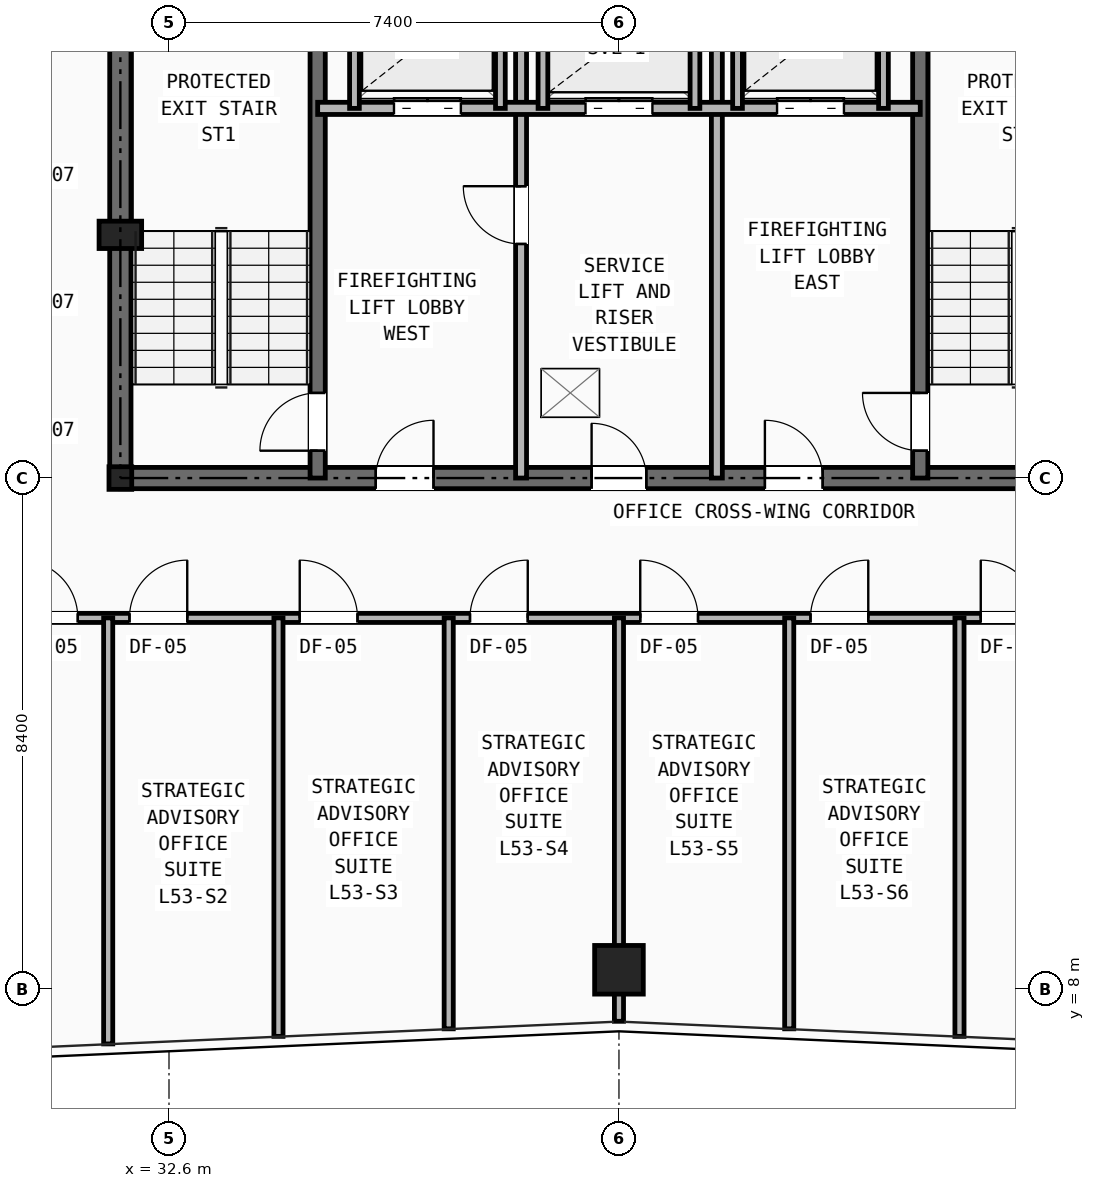
"""IFC4 building model, lengths in metres.
Left out: names, types, materials, properties, quantities, classifications, styles, units other than length and angle.
Written with IfcOpenShell. Run it as: python <this file> out.ifc"""

import sys

from ifc_helpers import new_model, si_unit, direction, frame, frame_2d, origin, origin_2d, place, context, subcontext, project, spatial, rectangle, hollow_rectangle, i_section, extrude, element, fill, save


model = new_model("IFC4")
c1 = context("Model", 3, precision=1e-05, world=origin(), true_north=direction((0.0, 1.0)))
c2 = subcontext(c1, "Body", "Model", "MODEL_VIEW")
j1 = project(units=[si_unit("LENGTHUNIT", "METRE"), si_unit("PLANEANGLEUNIT", "RADIAN")], contexts=[c1])
p1 = place(None, origin())
s1 = spatial("IfcSite", under=j1, at=p1, CompositionType="ELEMENT")
p2 = place(p1, origin())
s2 = spatial("IfcBuilding", under=s1, at=p2, CompositionType="ELEMENT")
p3 = place(p2, frame((0.0, 0.0, 186.15)))
s3 = spatial("IfcBuildingStorey", under=s2, at=p3, CompositionType="ELEMENT", Elevation=186.15)
p4 = place(p3, frame((31.8, 16.4, 0.0), z_axis=(0.0, 0.0, 1.0), x_axis=(1.0, 0.0, 0.0)))
e1 = element("IfcColumn", 1, at=p4, inside=s3, PredefinedType="COLUMN", context=c2, shape_type="SweptSolid", body=[
    extrude(i_section(OverallWidth=0.374, OverallDepth=0.372, WebThickness=0.016, FlangeThickness=0.026, at=origin_2d()), origin(), (0.0, 0.0, 1.0), 3.45),
])
p5 = place(p3, frame((31.8, 20.4, 0.0), z_axis=(0.0, 0.0, 1.0), x_axis=(1.0, 0.0, 0.0)))
e2 = element("IfcColumn", 2, at=p5, inside=s3, PredefinedType="PILASTER", context=c2, shape_type="SweptSolid", body=[
    extrude(rectangle(XDim=0.7, YDim=0.45, at=origin_2d()), origin(), (0.0, 0.0, 1.0), 3.45),
])
p6 = place(p3, frame((40.0, 8.312, 0.0), z_axis=(0.0, 0.0, 1.0), x_axis=(1.0, 0.0, 0.0)))
e3 = element("IfcColumn", 3, at=p6, inside=s3, PredefinedType="COLUMN", context=c2, shape_type="SweptSolid", body=[
    extrude(hollow_rectangle(XDim=0.8, YDim=0.8, WallThickness=0.055, at=origin_2d()), origin(), (0.0, 0.0, 1.0), 3.45),
])
p7 = place(p3, frame((31.8, 16.4, 0.0), z_axis=(0.0, 0.0, 1.0), x_axis=(1.0, 0.0, 0.0)))
e4 = element("IfcWall", 4, at=p7, inside=s3, PredefinedType="SHEAR", context=c2, shape_type="SweptSolid", body=[
    extrude(rectangle(XDim=16.4, YDim=0.35, at=frame_2d((8.2, 0.0))), origin(), (0.0, 0.0, 1.0), 3.21),
])
p8 = place(p7, frame((7.75, 0.0, 0.0)))
e5 = element("IfcOpeningElement", 5, at=p8, cuts=e4, PredefinedType="OPENING", context=c2, shape_type="SweptSolid", body=[
    extrude(rectangle(XDim=0.9, YDim=2.1, at=frame_2d((0.45, 1.05))), frame((0.0, 0.185, 0.0), z_axis=(0.0, -1.0, 0.0), x_axis=(1.0, 0.0, 0.0)), (0.0, 0.0, 1.0), 0.37),
])
p9 = place(p7, frame((4.2, 0.0, 0.0)))
e6 = element("IfcOpeningElement", 6, at=p9, cuts=e4, PredefinedType="OPENING", context=c2, shape_type="SweptSolid", body=[
    extrude(rectangle(XDim=0.95, YDim=2.1, at=frame_2d((0.475, 1.05))), frame((0.0, 0.185, 0.0), z_axis=(0.0, -1.0, 0.0), x_axis=(1.0, 0.0, 0.0)), (0.0, 0.0, 1.0), 0.37),
])
p10 = place(p7, frame((10.6, 0.0, 0.0)))
e7 = element("IfcOpeningElement", 7, at=p10, cuts=e4, PredefinedType="OPENING", context=c2, shape_type="SweptSolid", body=[
    extrude(rectangle(XDim=0.95, YDim=2.1, at=frame_2d((0.475, 1.05))), frame((0.0, 0.185, 0.0), z_axis=(0.0, -1.0, 0.0), x_axis=(1.0, 0.0, 0.0)), (0.0, 0.0, 1.0), 0.37),
])
p11 = place(p3, frame((31.8, 16.4, 0.0), z_axis=(0.0, 0.0, 1.0), x_axis=(0.0, 1.0, 0.0)))
e8 = element("IfcWall", 8, at=p11, inside=s3, PredefinedType="SHEAR", context=c2, shape_type="SweptSolid", body=[
    extrude(rectangle(XDim=14.8, YDim=0.35, at=frame_2d((7.4, 0.0))), origin(), (0.0, 0.0, 1.0), 3.21),
])
p12 = place(p11, frame((11.0, 0.0, 0.0)))
e9 = element("IfcOpeningElement", 9, at=p12, cuts=e8, PredefinedType="OPENING", context=c2, shape_type="SweptSolid", body=[
    extrude(rectangle(XDim=1.1, YDim=2.15, at=frame_2d((0.55, 1.075))), frame((0.0, 0.185, 0.0), z_axis=(0.0, -1.0, 0.0), x_axis=(1.0, 0.0, 0.0)), (0.0, 0.0, 1.0), 0.37),
])
p13 = place(p3, frame((35.045, 16.4, 0.0), z_axis=(0.0, 0.0, 1.0), x_axis=(0.0, 1.0, 0.0)))
e10 = element("IfcWall", 10, at=p13, inside=s3, PredefinedType="SHEAR", context=c2, shape_type="SweptSolid", body=[
    extrude(rectangle(XDim=8.4, YDim=0.25, at=frame_2d((4.2, 0.0))), origin(), (0.0, 0.0, 1.0), 3.21),
])
p14 = place(p13, frame((0.45, 0.0, 0.0)))
e11 = element("IfcOpeningElement", 11, at=p14, cuts=e10, PredefinedType="OPENING", context=c2, shape_type="SweptSolid", body=[
    extrude(rectangle(XDim=0.95, YDim=2.1, at=frame_2d((0.475, 1.05))), frame((0.0, 0.135, 0.0), z_axis=(0.0, -1.0, 0.0), x_axis=(1.0, 0.0, 0.0)), (0.0, 0.0, 1.0), 0.27),
])
p15 = place(p3, frame((44.955, 16.4, 0.0), z_axis=(0.0, 0.0, 1.0), x_axis=(0.0, 1.0, 0.0)))
e12 = element("IfcWall", 12, at=p15, inside=s3, PredefinedType="SHEAR", context=c2, shape_type="SweptSolid", body=[
    extrude(rectangle(XDim=8.4, YDim=0.25, at=frame_2d((4.2, 0.0))), origin(), (0.0, 0.0, 1.0), 3.21),
])
p16 = place(p15, frame((0.45, 0.0, 0.0)))
e13 = element("IfcOpeningElement", 13, at=p16, cuts=e12, PredefinedType="OPENING", context=c2, shape_type="SweptSolid", body=[
    extrude(rectangle(XDim=0.95, YDim=2.1, at=frame_2d((0.475, 1.05))), frame((0.0, 0.135, 0.0), z_axis=(0.0, -1.0, 0.0), x_axis=(1.0, 0.0, 0.0)), (0.0, 0.0, 1.0), 0.27),
])
p17 = place(p3, frame((38.39, 16.4, 0.0), z_axis=(0.0, 0.0, 1.0), x_axis=(0.0, 1.0, 0.0)))
e14 = element("IfcWall", 14, at=p17, inside=s3, PredefinedType="PARTITIONING", context=c2, shape_type="SweptSolid", body=[
    extrude(rectangle(XDim=8.4, YDim=0.18, at=frame_2d((4.2, 0.0))), origin(), (0.0, 0.0, 1.0), 2.665),
])
p18 = place(p17, frame((3.85, 0.0, 0.0)))
e15 = element("IfcOpeningElement", 15, at=p18, cuts=e14, PredefinedType="OPENING", context=c2, shape_type="SweptSolid", body=[
    extrude(rectangle(XDim=0.95, YDim=2.1, at=frame_2d((0.475, 1.05))), frame((0.0, 0.1, 0.0), z_axis=(0.0, -1.0, 0.0), x_axis=(1.0, 0.0, 0.0)), (0.0, 0.0, 1.0), 0.2),
])
p19 = place(p3, frame((41.61, 16.4, 0.0), z_axis=(0.0, 0.0, 1.0), x_axis=(0.0, 1.0, 0.0)))
e16 = element("IfcWall", 16, at=p19, inside=s3, PredefinedType="PARTITIONING", context=c2, shape_type="SweptSolid", body=[
    extrude(rectangle(XDim=8.4, YDim=0.18, at=frame_2d((4.2, 0.0))), origin(), (0.0, 0.0, 1.0), 2.665),
])
p20 = place(p3, frame((35.045, 22.48, 0.0), z_axis=(0.0, 0.0, 1.0), x_axis=(1.0, 0.0, 0.0)))
e17 = element("IfcWall", 17, at=p20, inside=s3, PredefinedType="SOLIDWALL", context=c2, shape_type="SweptSolid", body=[
    extrude(rectangle(XDim=9.91, YDim=0.2, at=frame_2d((4.955, 0.0))), origin(), (0.0, 0.0, 1.0), 3.21),
])
p21 = place(p20, frame((1.255, 0.0, 0.0)))
e18 = element("IfcOpeningElement", 18, at=p21, cuts=e17, PredefinedType="OPENING", context=c2, shape_type="SweptSolid", body=[
    extrude(rectangle(XDim=1.1, YDim=2.15, at=frame_2d((0.55, 1.075))), frame((0.0, 0.11, 0.0), z_axis=(0.0, -1.0, 0.0), x_axis=(1.0, 0.0, 0.0)), (0.0, 0.0, 1.0), 0.22),
])
p22 = place(p20, frame((7.555, 0.0, 0.0)))
e19 = element("IfcOpeningElement", 19, at=p22, cuts=e17, PredefinedType="OPENING", context=c2, shape_type="SweptSolid", body=[
    extrude(rectangle(XDim=1.1, YDim=2.15, at=frame_2d((0.55, 1.075))), frame((0.0, 0.11, 0.0), z_axis=(0.0, -1.0, 0.0), x_axis=(1.0, 0.0, 0.0)), (0.0, 0.0, 1.0), 0.22),
])
p23 = place(p20, frame((4.405, 0.0, 0.0)))
e20 = element("IfcOpeningElement", 20, at=p23, cuts=e17, PredefinedType="OPENING", context=c2, shape_type="SweptSolid", body=[
    extrude(rectangle(XDim=1.1, YDim=2.15, at=frame_2d((0.55, 1.075))), frame((0.0, 0.11, 0.0), z_axis=(0.0, -1.0, 0.0), x_axis=(1.0, 0.0, 0.0)), (0.0, 0.0, 1.0), 0.22),
])
for number, where, z_axis, x_axis in (
    (21, (35.65, 22.48, 0.0), (0.0, 0.0, 1.0), (0.0, 1.0, 0.0)),
    (22, (38.05, 22.48, 0.0), (0.0, 0.0, 1.0), (0.0, 1.0, 0.0)),
    (23, (41.95, 22.48, 0.0), (0.0, 0.0, 1.0), (0.0, 1.0, 0.0)),
    (24, (44.35, 22.48, 0.0), (0.0, 0.0, 1.0), (0.0, 1.0, 0.0)),
    (25, (38.75, 22.48, 0.0), (0.0, 0.0, 1.0), (0.0, 1.0, 0.0)),
    (26, (41.25, 22.48, 0.0), (0.0, 0.0, 1.0), (0.0, 1.0, 0.0)),
):
    element("IfcWall", number, at=place(p3, frame(where, z_axis=z_axis, x_axis=x_axis)), inside=s3, PredefinedType="SOLIDWALL", context=c2, shape_type="SweptSolid", body=[
        extrude(rectangle(XDim=2.32, YDim=0.16, at=frame_2d((1.16, 0.0))), origin(), (0.0, 0.0, 1.0), 3.21),
    ])
p24 = place(p3, frame((29.6, 14.1, 0.0), z_axis=(0.0, 0.0, 1.0), x_axis=(1.0, 0.0, 0.0)))
e27 = element("IfcWall", 27, at=p24, inside=s3, PredefinedType="PARTITIONING", context=c2, shape_type="SweptSolid", body=[
    extrude(rectangle(XDim=18.6, YDim=0.15, at=frame_2d((9.3, 0.0))), origin(), (0.0, 0.0, 1.0), 2.252),
])
p25 = place(p24, frame((0.55, 0.0, 0.0)))
e28 = element("IfcOpeningElement", 28, at=p25, cuts=e27, PredefinedType="OPENING", context=c2, shape_type="SweptSolid", body=[
    extrude(rectangle(XDim=0.95, YDim=2.1, at=frame_2d((0.475, 1.05))), frame((0.0, 0.085, 0.0), z_axis=(0.0, -1.0, 0.0), x_axis=(1.0, 0.0, 0.0)), (0.0, 0.0, 1.0), 0.17),
])
p26 = place(p24, frame((2.35, 0.0, 0.0)))
e29 = element("IfcOpeningElement", 29, at=p26, cuts=e27, PredefinedType="OPENING", context=c2, shape_type="SweptSolid", body=[
    extrude(rectangle(XDim=0.95, YDim=2.1, at=frame_2d((0.475, 1.05))), frame((0.0, 0.085, 0.0), z_axis=(0.0, -1.0, 0.0), x_axis=(1.0, 0.0, 0.0)), (0.0, 0.0, 1.0), 0.17),
])
p27 = place(p24, frame((5.15, 0.0, 0.0)))
e30 = element("IfcOpeningElement", 30, at=p27, cuts=e27, PredefinedType="OPENING", context=c2, shape_type="SweptSolid", body=[
    extrude(rectangle(XDim=0.95, YDim=2.1, at=frame_2d((0.475, 1.05))), frame((0.0, 0.085, 0.0), z_axis=(0.0, -1.0, 0.0), x_axis=(1.0, 0.0, 0.0)), (0.0, 0.0, 1.0), 0.17),
])
p28 = place(p24, frame((7.95, 0.0, 0.0)))
e31 = element("IfcOpeningElement", 31, at=p28, cuts=e27, PredefinedType="OPENING", context=c2, shape_type="SweptSolid", body=[
    extrude(rectangle(XDim=0.95, YDim=2.1, at=frame_2d((0.475, 1.05))), frame((0.0, 0.085, 0.0), z_axis=(0.0, -1.0, 0.0), x_axis=(1.0, 0.0, 0.0)), (0.0, 0.0, 1.0), 0.17),
])
p29 = place(p24, frame((10.75, 0.0, 0.0)))
e32 = element("IfcOpeningElement", 32, at=p29, cuts=e27, PredefinedType="OPENING", context=c2, shape_type="SweptSolid", body=[
    extrude(rectangle(XDim=0.95, YDim=2.1, at=frame_2d((0.475, 1.05))), frame((0.0, 0.085, 0.0), z_axis=(0.0, -1.0, 0.0), x_axis=(1.0, 0.0, 0.0)), (0.0, 0.0, 1.0), 0.17),
])
p30 = place(p24, frame((13.55, 0.0, 0.0)))
e33 = element("IfcOpeningElement", 33, at=p30, cuts=e27, PredefinedType="OPENING", context=c2, shape_type="SweptSolid", body=[
    extrude(rectangle(XDim=0.95, YDim=2.1, at=frame_2d((0.475, 1.05))), frame((0.0, 0.085, 0.0), z_axis=(0.0, -1.0, 0.0), x_axis=(1.0, 0.0, 0.0)), (0.0, 0.0, 1.0), 0.17),
])
p31 = place(p24, frame((16.35, 0.0, 0.0)))
e34 = element("IfcOpeningElement", 34, at=p31, cuts=e27, PredefinedType="OPENING", context=c2, shape_type="SweptSolid", body=[
    extrude(rectangle(XDim=0.95, YDim=2.1, at=frame_2d((0.475, 1.05))), frame((0.0, 0.085, 0.0), z_axis=(0.0, -1.0, 0.0), x_axis=(1.0, 0.0, 0.0)), (0.0, 0.0, 1.0), 0.17),
])
p32 = place(p3, frame((31.6, 7.093, 0.0), z_axis=(0.0, 0.0, 1.0), x_axis=(0.0, 1.0, 0.0)))
e35 = element("IfcWall", 35, at=p32, inside=s3, PredefinedType="PARTITIONING", context=c2, shape_type="SweptSolid", body=[
    extrude(rectangle(XDim=7.007, YDim=0.15, at=frame_2d((3.503, 0.0))), origin(), (0.0, 0.0, 1.0), 2.589),
])
p33 = place(p3, frame((34.4, 7.217, 0.0), z_axis=(0.0, 0.0, 1.0), x_axis=(0.0, 1.0, 0.0)))
e36 = element("IfcWall", 36, at=p33, inside=s3, PredefinedType="PARTITIONING", context=c2, shape_type="SweptSolid", body=[
    extrude(rectangle(XDim=6.883, YDim=0.15, at=frame_2d((3.441, 0.0))), origin(), (0.0, 0.0, 1.0), 2.252),
])
p34 = place(p3, frame((37.2, 7.342, 0.0), z_axis=(0.0, 0.0, 1.0), x_axis=(0.0, 1.0, 0.0)))
e37 = element("IfcWall", 37, at=p34, inside=s3, PredefinedType="PARTITIONING", context=c2, shape_type="SweptSolid", body=[
    extrude(rectangle(XDim=6.759, YDim=0.15, at=frame_2d((3.379, 0.0))), origin(), (0.0, 0.0, 1.0), 2.252),
])
p35 = place(p3, frame((40.0, 7.465, 0.0), z_axis=(0.0, 0.0, 1.0), x_axis=(0.0, 1.0, 0.0)))
e38 = element("IfcWall", 38, at=p35, inside=s3, PredefinedType="PARTITIONING", context=c2, shape_type="SweptSolid", body=[
    extrude(rectangle(XDim=6.635, YDim=0.15, at=frame_2d((3.317, 0.0))), origin(), (0.0, 0.0, 1.0), 2.252),
])
p36 = place(p3, frame((42.8, 7.342, 0.0), z_axis=(0.0, 0.0, 1.0), x_axis=(0.0, 1.0, 0.0)))
e39 = element("IfcWall", 39, at=p36, inside=s3, PredefinedType="PARTITIONING", context=c2, shape_type="SweptSolid", body=[
    extrude(rectangle(XDim=6.759, YDim=0.15, at=frame_2d((3.379, 0.0))), origin(), (0.0, 0.0, 1.0), 2.589),
])
p37 = place(p3, frame((45.6, 7.217, 0.0), z_axis=(0.0, 0.0, 1.0), x_axis=(0.0, 1.0, 0.0)))
e40 = element("IfcWall", 40, at=p37, inside=s3, PredefinedType="PARTITIONING", context=c2, shape_type="SweptSolid", body=[
    extrude(rectangle(XDim=6.883, YDim=0.15, at=frame_2d((3.441, 0.0))), origin(), (0.0, 0.0, 1.0), 2.589),
])
p38 = place(p8, origin())
e41 = element("IfcDoor", 41, at=p38, inside=s3, OperationType="SINGLE_SWING_LEFT", PredefinedType="DOOR", context=c2, shape_type="SweptSolid", body=[
    extrude(rectangle(XDim=0.9, YDim=2.1, at=frame_2d((0.45, 1.05))), frame((0.0, 0.025, 0.0), z_axis=(0.0, -1.0, 0.0), x_axis=(1.0, 0.0, 0.0)), (0.0, 0.0, 1.0), 0.05),
])
fill(e5, e41)
p39 = place(p18, origin())
e42 = element("IfcDoor", 42, at=p39, inside=s3, OperationType="SINGLE_SWING_RIGHT", PredefinedType="DOOR", context=c2, shape_type="SweptSolid", body=[
    extrude(rectangle(XDim=0.95, YDim=2.1, at=frame_2d((0.475, 1.05))), frame((0.0, 0.025, 0.0), z_axis=(0.0, -1.0, 0.0), x_axis=(1.0, 0.0, 0.0)), (0.0, 0.0, 1.0), 0.05),
])
fill(e15, e42)
p40 = place(p14, origin())
e43 = element("IfcDoor", 43, at=p40, inside=s3, OperationType="SINGLE_SWING_LEFT", PredefinedType="DOOR", context=c2, shape_type="SweptSolid", body=[
    extrude(rectangle(XDim=0.95, YDim=2.1, at=frame_2d((0.475, 1.05))), frame((0.0, 0.025, 0.0), z_axis=(0.0, -1.0, 0.0), x_axis=(1.0, 0.0, 0.0)), (0.0, 0.0, 1.0), 0.05),
])
fill(e11, e43)
p41 = place(p16, origin())
e44 = element("IfcDoor", 44, at=p41, inside=s3, OperationType="SINGLE_SWING_RIGHT", PredefinedType="DOOR", context=c2, shape_type="SweptSolid", body=[
    extrude(rectangle(XDim=0.95, YDim=2.1, at=frame_2d((0.475, 1.05))), frame((0.0, 0.025, 0.0), z_axis=(0.0, -1.0, 0.0), x_axis=(1.0, 0.0, 0.0)), (0.0, 0.0, 1.0), 0.05),
])
fill(e13, e44)
p42 = place(p9, origin())
e45 = element("IfcDoor", 45, at=p42, inside=s3, OperationType="SINGLE_SWING_RIGHT", PredefinedType="DOOR", context=c2, shape_type="SweptSolid", body=[
    extrude(rectangle(XDim=0.95, YDim=2.1, at=frame_2d((0.475, 1.05))), frame((0.0, 0.025, 0.0), z_axis=(0.0, -1.0, 0.0), x_axis=(1.0, 0.0, 0.0)), (0.0, 0.0, 1.0), 0.05),
])
fill(e6, e45)
p43 = place(p10, origin())
e46 = element("IfcDoor", 46, at=p43, inside=s3, OperationType="SINGLE_SWING_LEFT", PredefinedType="DOOR", context=c2, shape_type="SweptSolid", body=[
    extrude(rectangle(XDim=0.95, YDim=2.1, at=frame_2d((0.475, 1.05))), frame((0.0, 0.025, 0.0), z_axis=(0.0, -1.0, 0.0), x_axis=(1.0, 0.0, 0.0)), (0.0, 0.0, 1.0), 0.05),
])
fill(e7, e46)
p44 = place(p21, origin())
e47 = element("IfcDoor", 47, at=p44, inside=s3, OperationType="DOUBLE_DOOR_SLIDING", PredefinedType="DOOR", context=c2, shape_type="SweptSolid", body=[
    extrude(rectangle(XDim=1.1, YDim=2.15, at=frame_2d((0.55, 1.075))), frame((0.0, 0.025, 0.0), z_axis=(0.0, -1.0, 0.0), x_axis=(1.0, 0.0, 0.0)), (0.0, 0.0, 1.0), 0.05),
])
fill(e18, e47)
p45 = place(p22, origin())
e48 = element("IfcDoor", 48, at=p45, inside=s3, OperationType="DOUBLE_DOOR_SLIDING", PredefinedType="DOOR", context=c2, shape_type="SweptSolid", body=[
    extrude(rectangle(XDim=1.1, YDim=2.15, at=frame_2d((0.55, 1.075))), frame((0.0, 0.025, 0.0), z_axis=(0.0, -1.0, 0.0), x_axis=(1.0, 0.0, 0.0)), (0.0, 0.0, 1.0), 0.05),
])
fill(e19, e48)
p46 = place(p23, origin())
e49 = element("IfcDoor", 49, at=p46, inside=s3, OperationType="DOUBLE_DOOR_SLIDING", PredefinedType="DOOR", context=c2, shape_type="SweptSolid", body=[
    extrude(rectangle(XDim=1.1, YDim=2.15, at=frame_2d((0.55, 1.075))), frame((0.0, 0.025, 0.0), z_axis=(0.0, -1.0, 0.0), x_axis=(1.0, 0.0, 0.0)), (0.0, 0.0, 1.0), 0.05),
])
fill(e20, e49)
p47 = place(p25, origin())
e50 = element("IfcDoor", 50, at=p47, inside=s3, OperationType="SINGLE_SWING_LEFT", PredefinedType="DOOR", context=c2, shape_type="SweptSolid", body=[
    extrude(rectangle(XDim=0.95, YDim=2.1, at=frame_2d((0.475, 1.05))), frame((0.0, 0.025, 0.0), z_axis=(0.0, -1.0, 0.0), x_axis=(1.0, 0.0, 0.0)), (0.0, 0.0, 1.0), 0.05),
])
fill(e28, e50)
p48 = place(p26, origin())
e51 = element("IfcDoor", 51, at=p48, inside=s3, OperationType="SINGLE_SWING_RIGHT", PredefinedType="DOOR", context=c2, shape_type="SweptSolid", body=[
    extrude(rectangle(XDim=0.95, YDim=2.1, at=frame_2d((0.475, 1.05))), frame((0.0, 0.025, 0.0), z_axis=(0.0, -1.0, 0.0), x_axis=(1.0, 0.0, 0.0)), (0.0, 0.0, 1.0), 0.05),
])
fill(e29, e51)
p49 = place(p27, origin())
e52 = element("IfcDoor", 52, at=p49, inside=s3, OperationType="SINGLE_SWING_LEFT", PredefinedType="DOOR", context=c2, shape_type="SweptSolid", body=[
    extrude(rectangle(XDim=0.95, YDim=2.1, at=frame_2d((0.475, 1.05))), frame((0.0, 0.025, 0.0), z_axis=(0.0, -1.0, 0.0), x_axis=(1.0, 0.0, 0.0)), (0.0, 0.0, 1.0), 0.05),
])
fill(e30, e52)
p50 = place(p28, origin())
e53 = element("IfcDoor", 53, at=p50, inside=s3, OperationType="SINGLE_SWING_RIGHT", PredefinedType="DOOR", context=c2, shape_type="SweptSolid", body=[
    extrude(rectangle(XDim=0.95, YDim=2.1, at=frame_2d((0.475, 1.05))), frame((0.0, 0.025, 0.0), z_axis=(0.0, -1.0, 0.0), x_axis=(1.0, 0.0, 0.0)), (0.0, 0.0, 1.0), 0.05),
])
fill(e31, e53)
p51 = place(p29, origin())
e54 = element("IfcDoor", 54, at=p51, inside=s3, OperationType="SINGLE_SWING_LEFT", PredefinedType="DOOR", context=c2, shape_type="SweptSolid", body=[
    extrude(rectangle(XDim=0.95, YDim=2.1, at=frame_2d((0.475, 1.05))), frame((0.0, 0.025, 0.0), z_axis=(0.0, -1.0, 0.0), x_axis=(1.0, 0.0, 0.0)), (0.0, 0.0, 1.0), 0.05),
])
fill(e32, e54)
p52 = place(p30, origin())
e55 = element("IfcDoor", 55, at=p52, inside=s3, OperationType="SINGLE_SWING_RIGHT", PredefinedType="DOOR", context=c2, shape_type="SweptSolid", body=[
    extrude(rectangle(XDim=0.95, YDim=2.1, at=frame_2d((0.475, 1.05))), frame((0.0, 0.025, 0.0), z_axis=(0.0, -1.0, 0.0), x_axis=(1.0, 0.0, 0.0)), (0.0, 0.0, 1.0), 0.05),
])
fill(e33, e55)
p53 = place(p31, origin())
e56 = element("IfcDoor", 56, at=p53, inside=s3, OperationType="SINGLE_SWING_LEFT", PredefinedType="DOOR", context=c2, shape_type="SweptSolid", body=[
    extrude(rectangle(XDim=0.95, YDim=2.1, at=frame_2d((0.475, 1.05))), frame((0.0, 0.025, 0.0), z_axis=(0.0, -1.0, 0.0), x_axis=(1.0, 0.0, 0.0)), (0.0, 0.0, 1.0), 0.05),
])
fill(e34, e56)
save(model, sys.argv[1])
